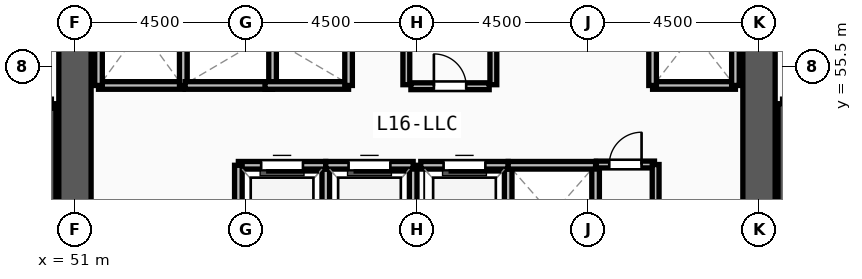
"""IFC4 building model, lengths in metres.
Left out: names, types, materials, properties, quantities, classifications, styles, units other than length and angle.
Written with IfcOpenShell. Run it as: python <this file> out.ifc"""

import sys

from ifc_helpers import new_model, si_unit, direction, frame, frame_2d, origin, place, context, subcontext, project, spatial, rectangle, extrude, source, transform, mapped, element, fill, save


model = new_model("IFC4")
c1 = context("Model", 3, precision=1e-05, world=origin(), true_north=direction((0.0, 1.0)))
c2 = subcontext(c1, "Body", "Model", "MODEL_VIEW")
j1 = project(units=[si_unit("LENGTHUNIT", "METRE"), si_unit("PLANEANGLEUNIT", "RADIAN")], contexts=[c1])
p1 = place(None, origin())
s1 = spatial("IfcSite", under=j1, at=p1, CompositionType="ELEMENT")
p2 = place(p1, origin())
s2 = spatial("IfcBuilding", under=s1, at=p2, CompositionType="ELEMENT")
p3 = place(p2, frame((0.0, 0.0, 63.0)))
s3 = spatial("IfcBuildingStorey", under=s2, at=p3, CompositionType="ELEMENT", Elevation=63.0)
p4 = place(p3, frame((69.0, 60.675, 0.0), z_axis=(0.0, 0.0, 1.0), x_axis=(0.0, -1.0, 0.0)))
e1 = element("IfcWall", 1, at=p4, inside=s3, PredefinedType="SHEAR", context=c2, shape_type="SweptSolid", body=[
    extrude(rectangle(XDim=13.35, YDim=0.85, at=frame_2d((6.675, 0.0))), origin(), (0.0, 0.0, 1.0), 3.57),
])
m1 = source(origin(), c2, "Body", "SweptSolid", [
    extrude(rectangle(XDim=1.2, YDim=2.2, at=frame_2d((0.6, 1.1))), frame((0.0, 0.435, 0.0), z_axis=(0.0, -1.0, 0.0), x_axis=(1.0, 0.0, 0.0)), (0.0, 0.0, 1.0), 0.87),
])
p5 = place(p4, frame((1.125, 0.0, 0.0)))
e2 = element("IfcOpeningElement", 2, at=p5, cuts=e1, PredefinedType="OPENING", context=c2, shape_type="MappedRepresentation", body=[
    mapped(m1, transform((0.0, 0.0, 0.0), x_axis=(1.0, 0.0, 0.0), y_axis=(0.0, 1.0, 0.0), z_axis=(0.0, 0.0, 1.0), scale=1.0)),
])
p6 = place(p3, frame((51.0, 47.325, 0.0), z_axis=(0.0, 0.0, 1.0), x_axis=(0.0, 1.0, 0.0)))
e3 = element("IfcWall", 3, at=p6, inside=s3, PredefinedType="SHEAR", context=c2, shape_type="SweptSolid", body=[
    extrude(rectangle(XDim=13.35, YDim=0.85, at=frame_2d((6.675, 0.0))), origin(), (0.0, 0.0, 1.0), 3.57),
])
for number, where, z_axis, x_axis in (
    (4, (50.38, 46.7, 0.0), (0.0, 0.0, 1.0), (0.0, 1.0, 0.0)),
    (5, (69.62, 54.52, 0.0), (0.0, 0.0, 1.0), (0.0, -1.0, 0.0)),
):
    element("IfcWall", number, at=place(p3, frame(where, z_axis=z_axis, x_axis=x_axis)), inside=s3, PredefinedType="SOLIDWALL", context=c2, shape_type="SweptSolid", body=[
        extrude(rectangle(XDim=7.82, YDim=0.24, at=frame_2d((3.91, 0.0))), origin(), (0.0, 0.0, 1.0), 3.57),
    ])
p7 = place(p3, frame((51.62, 55.0, 0.0), z_axis=(0.0, 0.0, 1.0), x_axis=(1.0, 0.0, 0.0)))
e6 = element("IfcWall", 6, at=p7, inside=s3, PredefinedType="SOLIDWALL", context=c2, shape_type="SweptSolid", body=[
    extrude(rectangle(XDim=2.23, YDim=0.2, at=frame_2d((1.115, 0.0))), origin(), (0.0, 0.0, 1.0), 3.57),
])
for number, where, z_axis, x_axis in (
    (7, (53.85, 55.0, 0.0), (0.0, 0.0, 1.0), (0.0, 1.0, 0.0)),
    (8, (51.62, 58.0, 0.0), (0.0, 0.0, 1.0), (0.0, -1.0, 0.0)),
):
    element("IfcWall", number, at=place(p3, frame(where, z_axis=z_axis, x_axis=x_axis)), inside=s3, PredefinedType="SOLIDWALL", context=c2, shape_type="SweptSolid", body=[
        extrude(rectangle(XDim=3.0, YDim=0.2, at=frame_2d((1.5, 0.0))), origin(), (0.0, 0.0, 1.0), 3.57),
    ])
p8 = place(p3, frame((66.2, 55.0, 0.0), z_axis=(0.0, 0.0, 1.0), x_axis=(1.0, 0.0, 0.0)))
e9 = element("IfcWall", 9, at=p8, inside=s3, PredefinedType="SOLIDWALL", context=c2, shape_type="SweptSolid", body=[
    extrude(rectangle(XDim=2.18, YDim=0.2, at=frame_2d((1.09, 0.0))), origin(), (0.0, 0.0, 1.0), 3.57),
])
for number, where, z_axis, x_axis in (
    (10, (68.38, 55.0, 0.0), (0.0, 0.0, 1.0), (0.0, 1.0, 0.0)),
    (11, (66.2, 57.75, 0.0), (0.0, 0.0, 1.0), (0.0, -1.0, 0.0)),
):
    element("IfcWall", number, at=place(p3, frame(where, z_axis=z_axis, x_axis=x_axis)), inside=s3, PredefinedType="SOLIDWALL", context=c2, shape_type="SweptSolid", body=[
        extrude(rectangle(XDim=2.75, YDim=0.2, at=frame_2d((1.375, 0.0))), origin(), (0.0, 0.0, 1.0), 3.57),
    ])
p9 = place(p3, frame((57.6, 50.3, 0.0), z_axis=(0.0, 0.0, 1.0), x_axis=(0.0, 1.0, 0.0)))
e12 = element("IfcWall", 12, at=p9, inside=s3, PredefinedType="SOLIDWALL", context=c2, shape_type="SweptSolid", body=[
    extrude(rectangle(XDim=2.6, YDim=0.2, at=frame_2d((1.3, 0.0))), origin(), (0.0, 0.0, 1.0), 3.57),
])
p10 = place(p3, frame((57.6, 52.9, 0.0), z_axis=(0.0, 0.0, 1.0), x_axis=(-1.0, 0.0, 0.0)))
e13 = element("IfcWall", 13, at=p10, inside=s3, PredefinedType="SOLIDWALL", context=c2, shape_type="SweptSolid", body=[
    extrude(rectangle(XDim=2.3, YDim=0.2, at=frame_2d((1.15, 0.0))), origin(), (0.0, 0.0, 1.0), 3.57),
])
m2 = source(origin(), c2, "Body", "SweptSolid", [
    extrude(rectangle(XDim=1.1, YDim=2.2, at=frame_2d((0.55, 1.1))), frame((0.0, 0.11, 0.0), z_axis=(0.0, -1.0, 0.0), x_axis=(1.0, 0.0, 0.0)), (0.0, 0.0, 1.0), 0.22),
])
p11 = place(p10, frame((0.6, 0.0, 0.0)))
e14 = element("IfcOpeningElement", 14, at=p11, cuts=e13, PredefinedType="OPENING", context=c2, shape_type="MappedRepresentation", body=[
    mapped(m2, transform((0.0, 0.0, 0.0), x_axis=(1.0, 0.0, 0.0), y_axis=(0.0, 1.0, 0.0), z_axis=(0.0, 0.0, 1.0), scale=1.0)),
])
for number, where, z_axis, x_axis in (
    (15, (55.3, 52.9, 0.0), (0.0, 0.0, 1.0), (0.0, -1.0, 0.0)),
    (16, (59.9, 50.3, 0.0), (0.0, 0.0, 1.0), (0.0, 1.0, 0.0)),
):
    element("IfcWall", number, at=place(p3, frame(where, z_axis=z_axis, x_axis=x_axis)), inside=s3, PredefinedType="SOLIDWALL", context=c2, shape_type="SweptSolid", body=[
        extrude(rectangle(XDim=2.6, YDim=0.2, at=frame_2d((1.3, 0.0))), origin(), (0.0, 0.0, 1.0), 3.57),
    ])
p12 = place(p3, frame((59.9, 52.9, 0.0), z_axis=(0.0, 0.0, 1.0), x_axis=(-1.0, 0.0, 0.0)))
e17 = element("IfcWall", 17, at=p12, inside=s3, PredefinedType="SOLIDWALL", context=c2, shape_type="SweptSolid", body=[
    extrude(rectangle(XDim=2.3, YDim=0.2, at=frame_2d((1.15, 0.0))), origin(), (0.0, 0.0, 1.0), 3.57),
])
p13 = place(p12, frame((0.6, 0.0, 0.0)))
e18 = element("IfcOpeningElement", 18, at=p13, cuts=e17, PredefinedType="OPENING", context=c2, shape_type="MappedRepresentation", body=[
    mapped(m2, transform((0.0, 0.0, 0.0), x_axis=(1.0, 0.0, 0.0), y_axis=(0.0, 1.0, 0.0), z_axis=(0.0, 0.0, 1.0), scale=1.0)),
])
p14 = place(p3, frame((62.4, 50.3, 0.0), z_axis=(0.0, 0.0, 1.0), x_axis=(0.0, 1.0, 0.0)))
e19 = element("IfcWall", 19, at=p14, inside=s3, PredefinedType="SOLIDWALL", context=c2, shape_type="SweptSolid", body=[
    extrude(rectangle(XDim=2.6, YDim=0.2, at=frame_2d((1.3, 0.0))), origin(), (0.0, 0.0, 1.0), 3.57),
])
p15 = place(p3, frame((62.4, 52.9, 0.0), z_axis=(0.0, 0.0, 1.0), x_axis=(-1.0, 0.0, 0.0)))
e20 = element("IfcWall", 20, at=p15, inside=s3, PredefinedType="SOLIDWALL", context=c2, shape_type="SweptSolid", body=[
    extrude(rectangle(XDim=2.3, YDim=0.2, at=frame_2d((1.15, 0.0))), origin(), (0.0, 0.0, 1.0), 3.57),
])
p16 = place(p15, frame((0.6, 0.0, 0.0)))
e21 = element("IfcOpeningElement", 21, at=p16, cuts=e20, PredefinedType="OPENING", context=c2, shape_type="MappedRepresentation", body=[
    mapped(m2, transform((0.0, 0.0, 0.0), x_axis=(1.0, 0.0, 0.0), y_axis=(0.0, 1.0, 0.0), z_axis=(0.0, 0.0, 1.0), scale=1.0)),
])
p17 = place(p3, frame((64.7, 50.3, 0.0), z_axis=(0.0, 0.0, 1.0), x_axis=(0.0, 1.0, 0.0)))
e22 = element("IfcWall", 22, at=p17, inside=s3, PredefinedType="SOLIDWALL", context=c2, shape_type="SweptSolid", body=[
    extrude(rectangle(XDim=2.6, YDim=0.2, at=frame_2d((1.3, 0.0))), origin(), (0.0, 0.0, 1.0), 3.57),
])
for number, where, z_axis, x_axis in (
    (23, (64.7, 52.9, 0.0), (0.0, 0.0, 1.0), (-1.0, 0.0, 0.0)),
    (24, (53.9, 55.0, 0.0), (0.0, 0.0, 1.0), (1.0, 0.0, 0.0)),
):
    element("IfcWall", number, at=place(p3, frame(where, z_axis=z_axis, x_axis=x_axis)), inside=s3, PredefinedType="SOLIDWALL", context=c2, shape_type="SweptSolid", body=[
        extrude(rectangle(XDim=2.3, YDim=0.2, at=frame_2d((1.15, 0.0))), origin(), (0.0, 0.0, 1.0), 3.57),
    ])
p18 = place(p3, frame((56.2, 55.0, 0.0), z_axis=(0.0, 0.0, 1.0), x_axis=(0.0, 1.0, 0.0)))
e25 = element("IfcWall", 25, at=p18, inside=s3, PredefinedType="SOLIDWALL", context=c2, shape_type="SweptSolid", body=[
    extrude(rectangle(XDim=2.6, YDim=0.2, at=frame_2d((1.3, 0.0))), origin(), (0.0, 0.0, 1.0), 3.57),
])
p19 = place(p3, frame((56.0, 55.0, 0.0), z_axis=(0.0, 0.0, 1.0), x_axis=(1.0, 0.0, 0.0)))
e26 = element("IfcWall", 26, at=p19, inside=s3, PredefinedType="SOLIDWALL", context=c2, shape_type="SweptSolid", body=[
    extrude(rectangle(XDim=2.2, YDim=0.2, at=frame_2d((1.1, 0.0))), origin(), (0.0, 0.0, 1.0), 3.57),
])
p20 = place(p3, frame((58.2, 55.0, 0.0), z_axis=(0.0, 0.0, 1.0), x_axis=(0.0, 1.0, 0.0)))
e27 = element("IfcWall", 27, at=p20, inside=s3, PredefinedType="SOLIDWALL", context=c2, shape_type="SweptSolid", body=[
    extrude(rectangle(XDim=2.6, YDim=0.2, at=frame_2d((1.3, 0.0))), origin(), (0.0, 0.0, 1.0), 3.57),
])
p21 = place(p3, frame((59.84, 54.98, 0.0), z_axis=(0.0, 0.0, 1.0), x_axis=(1.0, 0.0, 0.0)))
e28 = element("IfcWall", 28, at=p21, inside=s3, PredefinedType="PARTITIONING", context=c2, shape_type="SweptSolid", body=[
    extrude(rectangle(XDim=2.06, YDim=0.18, at=frame_2d((1.03, 0.0))), origin(), (0.0, 0.0, 1.0), 3.57),
])
m3 = source(origin(), c2, "Body", "SweptSolid", [
    extrude(rectangle(XDim=0.85, YDim=2.1, at=frame_2d((0.425, 1.05))), frame((0.0, 0.1, 0.0), z_axis=(0.0, -1.0, 0.0), x_axis=(1.0, 0.0, 0.0)), (0.0, 0.0, 1.0), 0.2),
])
p22 = place(p21, frame((0.605, 0.0, 0.0)))
e29 = element("IfcOpeningElement", 29, at=p22, cuts=e28, PredefinedType="OPENING", context=c2, shape_type="MappedRepresentation", body=[
    mapped(m3, transform((0.0, 0.0, 0.0), x_axis=(1.0, 0.0, 0.0), y_axis=(0.0, 1.0, 0.0), z_axis=(0.0, 0.0, 1.0), scale=1.0)),
])
p23 = place(p3, frame((64.72, 52.92, 0.0), z_axis=(0.0, 0.0, 1.0), x_axis=(1.0, 0.0, 0.0)))
e30 = element("IfcWall", 30, at=p23, inside=s3, PredefinedType="PARTITIONING", context=c2, shape_type="SweptSolid", body=[
    extrude(rectangle(XDim=1.53, YDim=0.18, at=frame_2d((0.765, 0.0))), origin(), (0.0, 0.0, 1.0), 3.57),
])
p24 = place(p23, frame((0.34, 0.0, 0.0)))
e31 = element("IfcOpeningElement", 31, at=p24, cuts=e30, PredefinedType="OPENING", context=c2, shape_type="MappedRepresentation", body=[
    mapped(m3, transform((0.0, 0.0, 0.0), x_axis=(1.0, 0.0, 0.0), y_axis=(0.0, 1.0, 0.0), z_axis=(0.0, 0.0, 1.0), scale=1.0)),
])
for number, where, z_axis, x_axis in (
    (32, (59.72, 55.02, 0.0), (0.0, 0.0, 1.0), (0.0, 1.0, 0.0)),
    (33, (62.01, 55.02, 0.0), (0.0, 0.0, 1.0), (0.0, 1.0, 0.0)),
):
    element("IfcWall", number, at=place(p3, frame(where, z_axis=z_axis, x_axis=x_axis)), inside=s3, PredefinedType="PARTITIONING", context=c2, shape_type="SweptSolid", body=[
        extrude(rectangle(XDim=1.73, YDim=0.18, at=frame_2d((0.865, 0.0))), origin(), (0.0, 0.0, 1.0), 3.57),
    ])
p25 = place(p3, frame((66.28, 50.35, 0.0), z_axis=(0.0, 0.0, 1.0), x_axis=(0.0, 1.0, 0.0)))
e34 = element("IfcWall", 34, at=p25, inside=s3, PredefinedType="PARTITIONING", context=c2, shape_type="SweptSolid", body=[
    extrude(rectangle(XDim=2.57, YDim=0.18, at=frame_2d((1.285, 0.0))), origin(), (0.0, 0.0, 1.0), 3.57),
])
m4 = source(origin(), c2, "Body", "SweptSolid", [
    extrude(rectangle(XDim=1.1, YDim=2.2, at=frame_2d((0.55, 1.1))), frame((0.0, 0.025, 0.0), z_axis=(0.0, -1.0, 0.0), x_axis=(1.0, 0.0, 0.0)), (0.0, 0.0, 1.0), 0.05),
])
p26 = place(p11, origin())
e35 = element("IfcDoor", 35, at=p26, inside=s3, OperationType="SLIDING_TO_LEFT", PredefinedType="DOOR", context=c2, shape_type="MappedRepresentation", body=[
    mapped(m4, transform((0.0, 0.0, 0.0), x_axis=(1.0, 0.0, 0.0), y_axis=(0.0, 1.0, 0.0), z_axis=(0.0, 0.0, 1.0), scale=1.0)),
])
fill(e14, e35)
p27 = place(p13, origin())
e36 = element("IfcDoor", 36, at=p27, inside=s3, OperationType="SLIDING_TO_LEFT", PredefinedType="DOOR", context=c2, shape_type="MappedRepresentation", body=[
    mapped(m4, transform((0.0, 0.0, 0.0), x_axis=(1.0, 0.0, 0.0), y_axis=(0.0, 1.0, 0.0), z_axis=(0.0, 0.0, 1.0), scale=1.0)),
])
fill(e18, e36)
p28 = place(p16, origin())
e37 = element("IfcDoor", 37, at=p28, inside=s3, OperationType="SLIDING_TO_LEFT", PredefinedType="DOOR", context=c2, shape_type="MappedRepresentation", body=[
    mapped(m4, transform((0.0, 0.0, 0.0), x_axis=(1.0, 0.0, 0.0), y_axis=(0.0, 1.0, 0.0), z_axis=(0.0, 0.0, 1.0), scale=1.0)),
])
fill(e21, e37)
m5 = source(origin(), c2, "Body", "SweptSolid", [
    extrude(rectangle(XDim=0.85, YDim=2.1, at=frame_2d((0.425, 1.05))), frame((0.0, 0.025, 0.0), z_axis=(0.0, -1.0, 0.0), x_axis=(1.0, 0.0, 0.0)), (0.0, 0.0, 1.0), 0.05),
])
p29 = place(p22, origin())
e38 = element("IfcDoor", 38, at=p29, inside=s3, OperationType="SINGLE_SWING_LEFT", PredefinedType="DOOR", context=c2, shape_type="MappedRepresentation", body=[
    mapped(m5, transform((0.0, 0.0, 0.0), x_axis=(1.0, 0.0, 0.0), y_axis=(0.0, 1.0, 0.0), z_axis=(0.0, 0.0, 1.0), scale=1.0)),
])
fill(e29, e38)
p30 = place(p24, origin())
e39 = element("IfcDoor", 39, at=p30, inside=s3, OperationType="SINGLE_SWING_RIGHT", PredefinedType="DOOR", context=c2, shape_type="MappedRepresentation", body=[
    mapped(m5, transform((0.0, 0.0, 0.0), x_axis=(1.0, 0.0, 0.0), y_axis=(0.0, 1.0, 0.0), z_axis=(0.0, 0.0, 1.0), scale=1.0)),
])
fill(e31, e39)
save(model, sys.argv[1])
